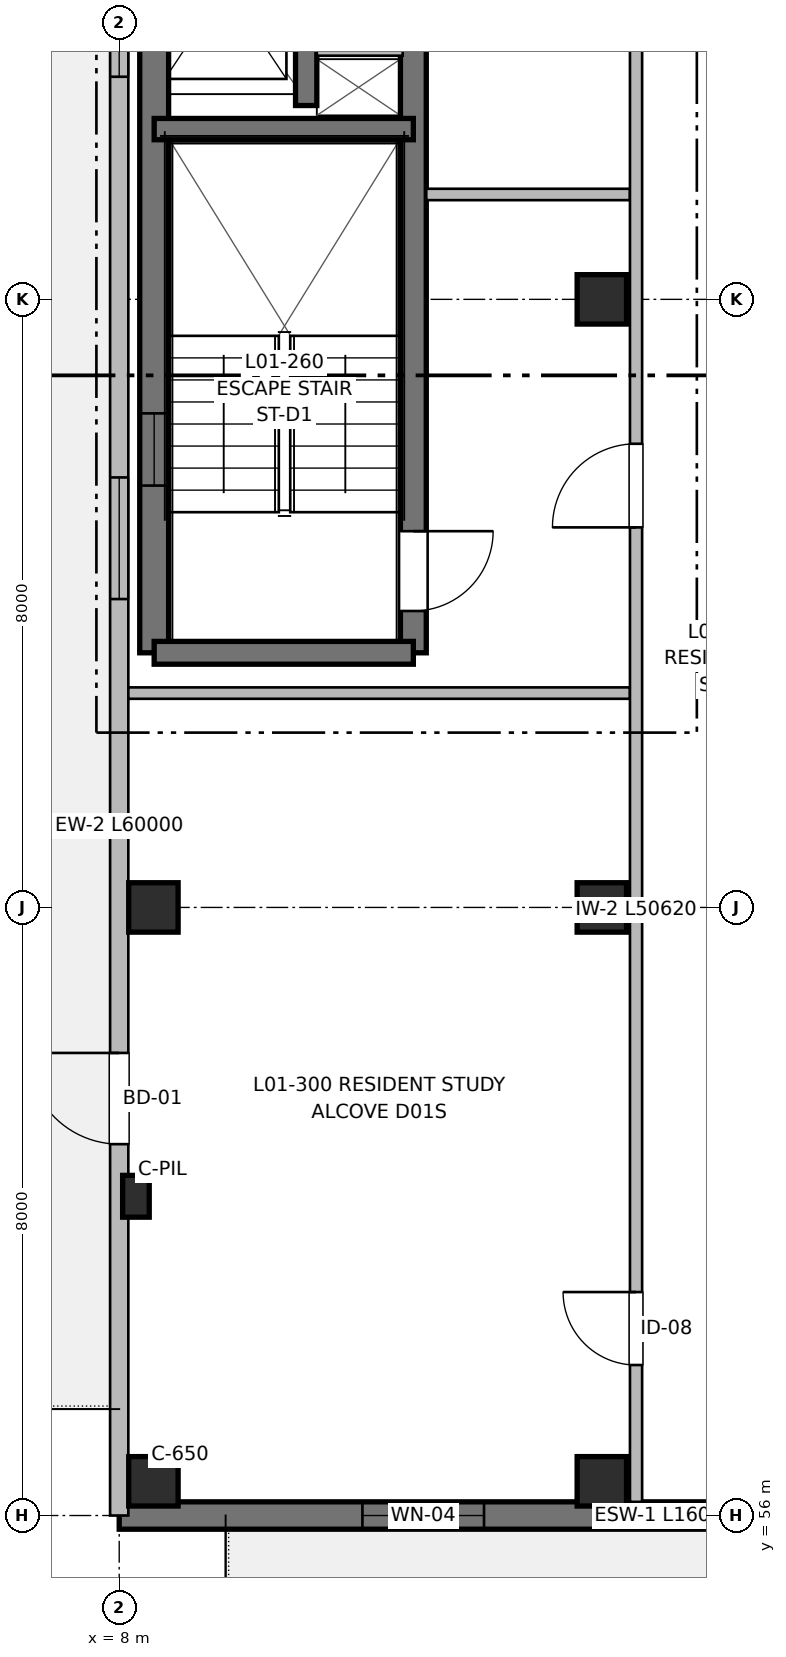
"""IFC4 building model, lengths in metres.
Left out: names, types, materials, properties, quantities, classifications, styles, units other than length and angle.
Written with IfcOpenShell. Run it as: python <this file> out.ifc"""

import sys

from ifc_helpers import new_model, si_unit, direction, frame, frame_2d, origin, origin_2d, place, context, subcontext, project, spatial, rectangle, extrude, element, fill, save


model = new_model("IFC4")
c1 = context("Model", 3, precision=1e-05, world=origin(), true_north=direction((0.0, 1.0)))
c2 = subcontext(c1, "Body", "Model", "MODEL_VIEW")
j1 = project(units=[si_unit("LENGTHUNIT", "METRE"), si_unit("PLANEANGLEUNIT", "RADIAN")], contexts=[c1])
p1 = place(None, origin())
s1 = spatial("IfcSite", under=j1, at=p1, CompositionType="ELEMENT")
p2 = place(p1, origin())
s2 = spatial("IfcBuilding", under=s1, at=p2, CompositionType="ELEMENT")
p3 = place(p2, frame((0.0, 0.0, 4.16)))
s3 = spatial("IfcBuildingStorey", under=s2, at=p3, CompositionType="ELEMENT", Elevation=4.16)
p4 = place(p3, frame((8.22, 60.2, 0.0), z_axis=(0.0, 0.0, 1.0), x_axis=(1.0, 0.0, 0.0)))
e1 = element("IfcColumn", 1, at=p4, inside=s3, PredefinedType="PILASTER", context=c2, shape_type="SweptSolid", body=[
    extrude(rectangle(XDim=0.35, YDim=0.55, at=origin_2d()), origin(), (0.0, 0.0, 1.0), 3.2),
])
for number, where, z_axis, x_axis in (
    (2, (8.45, 56.45, 0.0), (0.0, 0.0, 1.0), (1.0, 0.0, 0.0)),
    (3, (8.45, 64.0, 0.0), (0.0, 0.0, 1.0), (1.0, 0.0, 0.0)),
    (4, (14.35, 56.45, 0.0), (0.0, 0.0, 1.0), (1.0, 0.0, 0.0)),
    (5, (14.35, 64.0, 0.0), (0.0, 0.0, 1.0), (1.0, 0.0, 0.0)),
    (6, (14.35, 72.0, 0.0), (0.0, 0.0, 1.0), (1.0, 0.0, 0.0)),
):
    element("IfcColumn", number, at=place(p3, frame(where, z_axis=z_axis, x_axis=x_axis)), inside=s3, PredefinedType="COLUMN", context=c2, shape_type="SweptSolid", body=[
        extrude(rectangle(XDim=0.65, YDim=0.65, at=origin_2d()), origin(), (0.0, 0.0, 1.0), 3.2),
    ])
p5 = place(p3, frame((8.46, 67.35, 0.0), z_axis=(0.0, 0.0, 1.0), x_axis=(0.0, 1.0, 0.0)))
e7 = element("IfcWall", 7, at=p5, inside=s3, PredefinedType="SHEAR", context=c2, shape_type="SweptSolid", body=[
    extrude(rectangle(XDim=12.45, YDim=0.38, at=frame_2d((6.225, 0.0))), origin(), (0.0, 0.0, 1.0), 3.2),
])
p6 = place(p5, frame((2.2, 0.0, 0.97)))
e8 = element("IfcOpeningElement", 8, at=p6, cuts=e7, PredefinedType="OPENING", context=c2, shape_type="SweptSolid", body=[
    extrude(rectangle(XDim=0.95, YDim=1.25, at=frame_2d((0.475, 0.625))), frame((0.0, 0.2, 0.0), z_axis=(0.0, -1.0, 0.0), x_axis=(1.0, 0.0, 0.0)), (0.0, 0.0, 1.0), 0.4),
])
p7 = place(p3, frame((11.87, 79.8, 0.0), z_axis=(0.0, 0.0, 1.0), x_axis=(0.0, -1.0, 0.0)))
e9 = element("IfcWall", 9, at=p7, inside=s3, PredefinedType="SHEAR", context=c2, shape_type="SweptSolid", body=[
    extrude(rectangle(XDim=12.45, YDim=0.34, at=frame_2d((6.225, 0.0))), origin(), (0.0, 0.0, 1.0), 3.2),
])
p8 = place(p7, frame((10.85, 0.0, 0.0)))
e10 = element("IfcOpeningElement", 10, at=p8, cuts=e9, PredefinedType="OPENING", context=c2, shape_type="SweptSolid", body=[
    extrude(rectangle(XDim=1.05, YDim=2.15, at=frame_2d((0.525, 1.075))), frame((0.0, 0.18, 0.0), z_axis=(0.0, -1.0, 0.0), x_axis=(1.0, 0.0, 0.0)), (0.0, 0.0, 1.0), 0.36),
])
p9 = place(p3, frame((11.87, 67.35, 0.0), z_axis=(0.0, 0.0, 1.0), x_axis=(-1.0, 0.0, 0.0)))
e11 = element("IfcWall", 11, at=p9, inside=s3, PredefinedType="SHEAR", context=c2, shape_type="SweptSolid", body=[
    extrude(rectangle(XDim=3.41, YDim=0.3, at=frame_2d((1.705, 0.0))), origin(), (0.0, 0.0, 1.0), 3.2),
])
p10 = place(p3, frame((8.46, 74.24, 0.0), z_axis=(0.0, 0.0, 1.0), x_axis=(1.0, 0.0, 0.0)))
e12 = element("IfcWall", 12, at=p10, inside=s3, PredefinedType="SHEAR", context=c2, shape_type="SweptSolid", body=[
    extrude(rectangle(XDim=3.41, YDim=0.28, at=frame_2d((1.705, 0.0))), origin(), (0.0, 0.0, 1.0), 3.2),
])
p11 = place(p3, frame((10.46, 74.55, 0.0), z_axis=(0.0, 0.0, 1.0), x_axis=(0.0, 1.0, 0.0)))
e13 = element("IfcWall", 13, at=p11, inside=s3, PredefinedType="SHEAR", context=c2, shape_type="SweptSolid", body=[
    extrude(rectangle(XDim=5.25, YDim=0.28, at=frame_2d((2.625, 0.0))), origin(), (0.0, 0.0, 1.0), 3.2),
])
p12 = place(p11, frame((1.15, 0.0, 0.0)))
e14 = element("IfcOpeningElement", 14, at=p12, cuts=e13, PredefinedType="OPENING", context=c2, shape_type="SweptSolid", body=[
    extrude(rectangle(XDim=1.0, YDim=2.15, at=frame_2d((0.5, 1.075))), frame((0.0, 0.15, 0.0), z_axis=(0.0, -1.0, 0.0), x_axis=(1.0, 0.0, 0.0)), (0.0, 0.0, 1.0), 0.3),
])
p13 = place(p11, frame((3.85, 0.0, 0.0)))
e15 = element("IfcOpeningElement", 15, at=p13, cuts=e13, PredefinedType="OPENING", context=c2, shape_type="SweptSolid", body=[
    extrude(rectangle(XDim=0.9, YDim=2.15, at=frame_2d((0.45, 1.075))), frame((0.0, 0.15, 0.0), z_axis=(0.0, -1.0, 0.0), x_axis=(1.0, 0.0, 0.0)), (0.0, 0.0, 1.0), 0.3),
])
p14 = place(p3, frame((10.6, 75.28, 0.0), z_axis=(0.0, 0.0, 1.0), x_axis=(1.0, 0.0, 0.0)))
e16 = element("IfcWall", 16, at=p14, inside=s3, PredefinedType="PARTITIONING", context=c2, shape_type="SweptSolid", body=[
    extrude(rectangle(XDim=1.13, YDim=0.15, at=frame_2d((0.565, 0.0))), origin(), (0.0, 0.0, 1.0), 2.95),
])
p15 = place(p3, frame((24.0, 56.0, 0.0), z_axis=(0.0, 0.0, 1.0), x_axis=(-1.0, 0.0, 0.0)))
e17 = element("IfcWall", 17, at=p15, inside=s3, PredefinedType="SHEAR", context=c2, shape_type="SweptSolid", body=[
    extrude(rectangle(XDim=16.0, YDim=0.36, at=frame_2d((8.0, 0.0))), origin(), (0.0, 0.0, 1.0), 2.98),
])
p16 = place(p15, frame((2.55, 0.0, 0.0)))
e18 = element("IfcOpeningElement", 18, at=p16, cuts=e17, PredefinedType="OPENING", context=c2, shape_type="SweptSolid", body=[
    extrude(rectangle(XDim=1.2, YDim=2.2, at=frame_2d((0.6, 1.1))), frame((0.0, 0.19, 0.0), z_axis=(0.0, -1.0, 0.0), x_axis=(1.0, 0.0, 0.0)), (0.0, 0.0, 1.0), 0.38),
])
p17 = place(p15, frame((4.85, 0.0, 0.77)))
e19 = element("IfcOpeningElement", 19, at=p17, cuts=e17, PredefinedType="OPENING", context=c2, shape_type="SweptSolid", body=[
    extrude(rectangle(XDim=1.6, YDim=1.45, at=frame_2d((0.8, 0.725))), frame((0.0, 0.19, 0.0), z_axis=(0.0, -1.0, 0.0), x_axis=(1.0, 0.0, 0.0)), (0.0, 0.0, 1.0), 0.38),
])
p18 = place(p15, frame((11.2, 0.0, 0.77)))
e20 = element("IfcOpeningElement", 20, at=p18, cuts=e17, PredefinedType="OPENING", context=c2, shape_type="SweptSolid", body=[
    extrude(rectangle(XDim=1.6, YDim=1.45, at=frame_2d((0.8, 0.725))), frame((0.0, 0.19, 0.0), z_axis=(0.0, -1.0, 0.0), x_axis=(1.0, 0.0, 0.0)), (0.0, 0.0, 1.0), 0.38),
])
p19 = place(p3, frame((8.0, 56.0, 0.0), z_axis=(0.0, 0.0, 1.0), x_axis=(0.0, 1.0, 0.0)))
e21 = element("IfcWall", 21, at=p19, inside=s3, PredefinedType="SOLIDWALL", context=c2, shape_type="SweptSolid", body=[
    extrude(rectangle(XDim=60.0, YDim=0.24, at=frame_2d((30.0, 0.0))), origin(), (0.0, 0.0, 1.0), 2.98),
])
p20 = place(p19, frame((4.886, 0.0, 0.0)))
e22 = element("IfcOpeningElement", 22, at=p20, cuts=e21, PredefinedType="OPENING", context=c2, shape_type="SweptSolid", body=[
    extrude(rectangle(XDim=1.2, YDim=2.2, at=frame_2d((0.6, 1.1))), frame((0.0, 0.13, 0.0), z_axis=(0.0, -1.0, 0.0), x_axis=(1.0, 0.0, 0.0)), (0.0, 0.0, 1.0), 0.26),
])
p21 = place(p19, frame((12.057, 0.0, 0.77)))
e23 = element("IfcOpeningElement", 23, at=p21, cuts=e21, PredefinedType="OPENING", context=c2, shape_type="SweptSolid", body=[
    extrude(rectangle(XDim=1.6, YDim=1.45, at=frame_2d((0.8, 0.725))), frame((0.0, 0.13, 0.0), z_axis=(0.0, -1.0, 0.0), x_axis=(1.0, 0.0, 0.0)), (0.0, 0.0, 1.0), 0.26),
])
p22 = place(p19, frame((18.929, 0.0, 0.72)))
e24 = element("IfcOpeningElement", 24, at=p22, cuts=e21, PredefinedType="OPENING", context=c2, shape_type="SweptSolid", body=[
    extrude(rectangle(XDim=2.4, YDim=1.5, at=frame_2d((1.2, 0.75))), frame((0.0, 0.13, 0.0), z_axis=(0.0, -1.0, 0.0), x_axis=(1.0, 0.0, 0.0)), (0.0, 0.0, 1.0), 0.26),
])
p23 = place(p19, frame((29.25, 0.0, 0.82)))
e25 = element("IfcOpeningElement", 25, at=p23, cuts=e21, PredefinedType="OPENING", context=c2, shape_type="SweptSolid", body=[
    extrude(rectangle(XDim=1.5, YDim=1.4, at=frame_2d((0.75, 0.7))), frame((0.0, 0.13, 0.0), z_axis=(0.0, -1.0, 0.0), x_axis=(1.0, 0.0, 0.0)), (0.0, 0.0, 1.0), 0.26),
])
p24 = place(p19, frame((37.796, 0.0, 0.82)))
e26 = element("IfcOpeningElement", 26, at=p24, cuts=e21, PredefinedType="OPENING", context=c2, shape_type="SweptSolid", body=[
    extrude(rectangle(XDim=1.55, YDim=1.4, at=frame_2d((0.775, 0.7))), frame((0.0, 0.13, 0.0), z_axis=(0.0, -1.0, 0.0), x_axis=(1.0, 0.0, 0.0)), (0.0, 0.0, 1.0), 0.26),
])
p25 = place(p19, frame((46.443, 0.0, 0.87)))
e27 = element("IfcOpeningElement", 27, at=p25, cuts=e21, PredefinedType="OPENING", context=c2, shape_type="SweptSolid", body=[
    extrude(rectangle(XDim=1.4, YDim=1.35, at=frame_2d((0.7, 0.675))), frame((0.0, 0.13, 0.0), z_axis=(0.0, -1.0, 0.0), x_axis=(1.0, 0.0, 0.0)), (0.0, 0.0, 1.0), 0.26),
])
p26 = place(p19, frame((55.539, 0.0, 0.87)))
e28 = element("IfcOpeningElement", 28, at=p26, cuts=e21, PredefinedType="OPENING", context=c2, shape_type="SweptSolid", body=[
    extrude(rectangle(XDim=1.25, YDim=1.35, at=frame_2d((0.625, 0.675))), frame((0.0, 0.13, 0.0), z_axis=(0.0, -1.0, 0.0), x_axis=(1.0, 0.0, 0.0)), (0.0, 0.0, 1.0), 0.26),
])
p27 = place(p3, frame((8.12, 66.82, 0.0), z_axis=(0.0, 0.0, 1.0), x_axis=(1.0, 0.0, 0.0)))
e29 = element("IfcWall", 29, at=p27, inside=s3, PredefinedType="PARTITIONING", context=c2, shape_type="SweptSolid", body=[
    extrude(rectangle(XDim=6.6, YDim=0.15, at=frame_2d((3.3, 0.0))), origin(), (0.0, 0.0, 1.0), 2.935),
])
p28 = place(p3, frame((12.04, 73.38, 0.0), z_axis=(0.0, 0.0, 1.0), x_axis=(1.0, 0.0, 0.0)))
e30 = element("IfcWall", 30, at=p28, inside=s3, PredefinedType="PARTITIONING", context=c2, shape_type="SweptSolid", body=[
    extrude(rectangle(XDim=2.68, YDim=0.15, at=frame_2d((1.34, 0.0))), origin(), (0.0, 0.0, 1.0), 2.935),
])
p29 = place(p3, frame((14.8, 56.18, 0.0), z_axis=(0.0, 0.0, 1.0), x_axis=(0.0, 1.0, 0.0)))
e31 = element("IfcWall", 31, at=p29, inside=s3, PredefinedType="PARTITIONING", context=c2, shape_type="SweptSolid", body=[
    extrude(rectangle(XDim=50.62, YDim=0.16, at=frame_2d((25.31, 0.0))), origin(), (0.0, 0.0, 1.0), 2.935),
])
p30 = place(p29, frame((12.82, 0.0, 0.0)))
e32 = element("IfcOpeningElement", 32, at=p30, cuts=e31, PredefinedType="OPENING", context=c2, shape_type="SweptSolid", body=[
    extrude(rectangle(XDim=1.1, YDim=2.15, at=frame_2d((0.55, 1.075))), frame((0.0, 0.09, 0.0), z_axis=(0.0, -1.0, 0.0), x_axis=(1.0, 0.0, 0.0)), (0.0, 0.0, 1.0), 0.18),
])
p31 = place(p29, frame((19.22, 0.0, 0.0)))
e33 = element("IfcOpeningElement", 33, at=p31, cuts=e31, PredefinedType="OPENING", context=c2, shape_type="SweptSolid", body=[
    extrude(rectangle(XDim=1.6, YDim=2.15, at=frame_2d((0.8, 1.075))), frame((0.0, 0.09, 0.0), z_axis=(0.0, -1.0, 0.0), x_axis=(1.0, 0.0, 0.0)), (0.0, 0.0, 1.0), 0.18),
])
p32 = place(p29, frame((1.8, 0.0, 0.0)))
e34 = element("IfcOpeningElement", 34, at=p32, cuts=e31, PredefinedType="OPENING", context=c2, shape_type="SweptSolid", body=[
    extrude(rectangle(XDim=0.96, YDim=2.15, at=frame_2d((0.48, 1.075))), frame((0.0, 0.09, 0.0), z_axis=(0.0, -1.0, 0.0), x_axis=(1.0, 0.0, 0.0)), (0.0, 0.0, 1.0), 0.18),
])
p33 = place(p29, frame((32.725, 0.0, 0.0)))
e35 = element("IfcOpeningElement", 35, at=p33, cuts=e31, PredefinedType="OPENING", context=c2, shape_type="SweptSolid", body=[
    extrude(rectangle(XDim=0.98, YDim=2.15, at=frame_2d((0.49, 1.075))), frame((0.0, 0.09, 0.0), z_axis=(0.0, -1.0, 0.0), x_axis=(1.0, 0.0, 0.0)), (0.0, 0.0, 1.0), 0.18),
])
p34 = place(p29, frame((40.935, 0.0, 0.0)))
e36 = element("IfcOpeningElement", 36, at=p34, cuts=e31, PredefinedType="OPENING", context=c2, shape_type="SweptSolid", body=[
    extrude(rectangle(XDim=0.98, YDim=2.15, at=frame_2d((0.49, 1.075))), frame((0.0, 0.09, 0.0), z_axis=(0.0, -1.0, 0.0), x_axis=(1.0, 0.0, 0.0)), (0.0, 0.0, 1.0), 0.18),
])
p35 = place(p8, origin())
e37 = element("IfcDoor", 37, at=p35, inside=s3, OperationType="SINGLE_SWING_LEFT", PredefinedType="DOOR", context=c2, shape_type="SweptSolid", body=[
    extrude(rectangle(XDim=1.05, YDim=2.15, at=frame_2d((0.525, 1.075))), frame((0.0, 0.025, 0.0), z_axis=(0.0, -1.0, 0.0), x_axis=(1.0, 0.0, 0.0)), (0.0, 0.0, 1.0), 0.05),
])
fill(e10, e37)
p36 = place(p6, origin())
e38 = element("IfcWindow", 38, at=p36, inside=s3, PartitioningType="SINGLE_PANEL", PredefinedType="WINDOW", context=c2, shape_type="SweptSolid", body=[
    extrude(rectangle(XDim=0.95, YDim=1.25, at=frame_2d((0.475, 0.625))), frame((0.0, 0.03, 0.0), z_axis=(0.0, -1.0, 0.0), x_axis=(1.0, 0.0, 0.0)), (0.0, 0.0, 1.0), 0.06),
])
fill(e8, e38)
p37 = place(p18, origin())
e39 = element("IfcWindow", 39, at=p37, inside=s3, PartitioningType="SINGLE_PANEL", PredefinedType="WINDOW", context=c2, shape_type="SweptSolid", body=[
    extrude(rectangle(XDim=1.6, YDim=1.45, at=frame_2d((0.8, 0.725))), frame((0.0, 0.03, 0.0), z_axis=(0.0, -1.0, 0.0), x_axis=(1.0, 0.0, 0.0)), (0.0, 0.0, 1.0), 0.06),
])
fill(e20, e39)
p38 = place(p20, origin())
e40 = element("IfcDoor", 40, at=p38, inside=s3, OperationType="SINGLE_SWING_RIGHT", PredefinedType="DOOR", context=c2, shape_type="SweptSolid", body=[
    extrude(rectangle(XDim=1.2, YDim=2.2, at=frame_2d((0.6, 1.1))), frame((0.0, 0.025, 0.0), z_axis=(0.0, -1.0, 0.0), x_axis=(1.0, 0.0, 0.0)), (0.0, 0.0, 1.0), 0.05),
])
fill(e22, e40)
p39 = place(p21, origin())
e41 = element("IfcWindow", 41, at=p39, inside=s3, PartitioningType="SINGLE_PANEL", PredefinedType="WINDOW", context=c2, shape_type="SweptSolid", body=[
    extrude(rectangle(XDim=1.6, YDim=1.45, at=frame_2d((0.8, 0.725))), frame((0.0, 0.03, 0.0), z_axis=(0.0, -1.0, 0.0), x_axis=(1.0, 0.0, 0.0)), (0.0, 0.0, 1.0), 0.06),
])
fill(e23, e41)
p40 = place(p22, origin())
e42 = element("IfcWindow", 42, at=p40, inside=s3, PartitioningType="SINGLE_PANEL", PredefinedType="WINDOW", context=c2, shape_type="SweptSolid", body=[
    extrude(rectangle(XDim=2.4, YDim=1.5, at=frame_2d((1.2, 0.75))), frame((0.0, 0.03, 0.0), z_axis=(0.0, -1.0, 0.0), x_axis=(1.0, 0.0, 0.0)), (0.0, 0.0, 1.0), 0.06),
])
fill(e24, e42)
p41 = place(p30, origin())
e43 = element("IfcDoor", 43, at=p41, inside=s3, OperationType="SINGLE_SWING_LEFT", PredefinedType="DOOR", context=c2, shape_type="SweptSolid", body=[
    extrude(rectangle(XDim=1.1, YDim=2.15, at=frame_2d((0.55, 1.075))), frame((0.0, 0.025, 0.0), z_axis=(0.0, -1.0, 0.0), x_axis=(1.0, 0.0, 0.0)), (0.0, 0.0, 1.0), 0.05),
])
fill(e32, e43)
p42 = place(p32, origin())
e44 = element("IfcDoor", 44, at=p42, inside=s3, OperationType="SINGLE_SWING_RIGHT", PredefinedType="DOOR", context=c2, shape_type="SweptSolid", body=[
    extrude(rectangle(XDim=0.96, YDim=2.15, at=frame_2d((0.48, 1.075))), frame((0.0, 0.025, 0.0), z_axis=(0.0, -1.0, 0.0), x_axis=(1.0, 0.0, 0.0)), (0.0, 0.0, 1.0), 0.05),
])
fill(e34, e44)
save(model, sys.argv[1])
